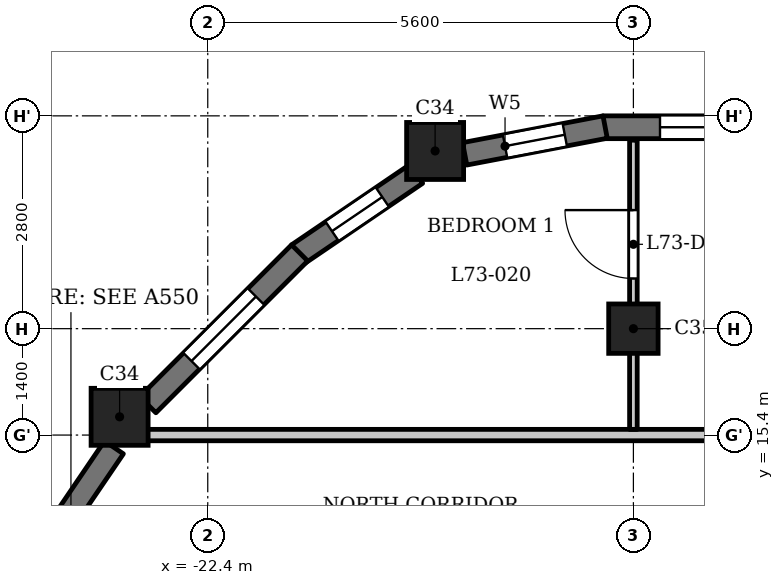
"""IFC4 building model, lengths in metres.
Left out: names, types, materials, properties, quantities, classifications, styles, units other than length and angle.
Written with IfcOpenShell. Run it as: python <this file> out.ifc"""

import sys

from ifc_helpers import new_model, si_unit, direction, frame, frame_2d, origin, origin_2d, place, context, subcontext, project, spatial, rectangle, extrude, element, fill, save


model = new_model("IFC4")
c1 = context("Model", 3, precision=1e-05, world=origin(), true_north=direction((0.0, 1.0)))
c2 = subcontext(c1, "Body", "Model", "MODEL_VIEW")
j1 = project(units=[si_unit("LENGTHUNIT", "METRE"), si_unit("PLANEANGLEUNIT", "RADIAN")], contexts=[c1])
p1 = place(None, origin())
s1 = spatial("IfcSite", under=j1, at=p1, CompositionType="ELEMENT")
p2 = place(p1, origin())
s2 = spatial("IfcBuilding", under=s1, at=p2, CompositionType="ELEMENT")
p3 = place(p2, frame((0.0, 0.0, 280.2)))
s3 = spatial("IfcBuildingStorey", under=s2, at=p3, CompositionType="ELEMENT", Elevation=280.2)
for number, where, z_axis, x_axis in (
    (1, (-19.409, 19.138, 0.0), (0.0, 0.0, 1.0), (1.0, 0.0, 0.0)),
    (2, (-23.56, 15.64, 0.0), (0.0, 0.0, 1.0), (1.0, 0.0, 0.0)),
):
    element("IfcColumn", number, at=place(p3, frame(where, z_axis=z_axis, x_axis=x_axis)), inside=s3, PredefinedType="COLUMN", context=c2, shape_type="SweptSolid", body=[
        extrude(rectangle(XDim=0.75, YDim=0.75, at=origin_2d()), origin(), (0.0, 0.0, 1.0), 3.5),
    ])
p4 = place(p3, frame((-16.8, 16.8, 0.0), z_axis=(0.0, 0.0, 1.0), x_axis=(1.0, 0.0, 0.0)))
e3 = element("IfcColumn", 3, at=p4, inside=s3, PredefinedType="COLUMN", context=c2, shape_type="SweptSolid", body=[
    extrude(rectangle(XDim=0.65, YDim=0.65, at=origin_2d()), origin(), (0.0, 0.0, 1.0), 3.5),
])
p5 = place(p3, frame((-14.375, 19.45, 0.0), z_axis=(0.0, 0.0, 1.0), x_axis=(-1.0, 0.0, 0.0)))
e4 = element("IfcWall", 4, at=p5, inside=s3, PredefinedType="SOLIDWALL", context=c2, shape_type="SweptSolid", body=[
    extrude(rectangle(XDim=2.825, YDim=0.3, at=frame_2d((1.413, 0.0))), origin(), (0.0, 0.0, 1.0), 2.5),
])
p6 = place(p5, frame((0.275, 0.0, 0.9)))
e5 = element("IfcOpeningElement", 5, at=p6, cuts=e4, PredefinedType="OPENING", context=c2, shape_type="SweptSolid", body=[
    extrude(rectangle(XDim=1.8, YDim=1.25, at=frame_2d((0.9, 0.625))), frame((0.0, 0.16, 0.0), z_axis=(0.0, -1.0, 0.0), x_axis=(1.0, 0.0, 0.0)), (0.0, 0.0, 1.0), 0.32),
])
p7 = place(p3, frame((-17.172, 19.453, 0.0), z_axis=(0.0, 0.0, 1.0), x_axis=(-0.982284001233, -0.187398348234, 0.0)))
e6 = element("IfcWall", 6, at=p7, inside=s3, PredefinedType="SOLIDWALL", context=c2, shape_type="SweptSolid", body=[
    extrude(rectangle(XDim=1.881, YDim=0.3, at=frame_2d((0.941, 0.0))), origin(), (0.0, 0.0, 1.0), 2.5),
])
p8 = place(p7, frame((0.541, 0.0, 0.6)))
e7 = element("IfcOpeningElement", 7, at=p8, cuts=e6, PredefinedType="OPENING", context=c2, shape_type="SweptSolid", body=[
    extrude(rectangle(XDim=0.8, YDim=1.55, at=frame_2d((0.4, 0.775))), frame((0.0, 0.16, 0.0), z_axis=(0.0, -1.0, 0.0), x_axis=(1.0, 0.0, 0.0)), (0.0, 0.0, 1.0), 0.32),
])
p9 = place(p3, frame((-19.657, 18.836, 0.0), z_axis=(0.0, 0.0, 1.0), x_axis=(-0.82704477487, -0.562136051469, 0.0)))
e8 = element("IfcWall", 8, at=p9, inside=s3, PredefinedType="SOLIDWALL", context=c2, shape_type="SweptSolid", body=[
    extrude(rectangle(XDim=1.881, YDim=0.3, at=frame_2d((0.94, 0.0))), origin(), (0.0, 0.0, 1.0), 2.5),
])
p10 = place(p9, frame((0.541, 0.0, 0.6)))
e9 = element("IfcOpeningElement", 9, at=p10, cuts=e8, PredefinedType="OPENING", context=c2, shape_type="SweptSolid", body=[
    extrude(rectangle(XDim=0.8, YDim=1.55, at=frame_2d((0.4, 0.775))), frame((0.0, 0.16, 0.0), z_axis=(0.0, -1.0, 0.0), x_axis=(1.0, 0.0, 0.0)), (0.0, 0.0, 1.0), 0.32),
])
p11 = place(p3, frame((-21.191, 17.797, 0.0), z_axis=(0.0, 0.0, 1.0), x_axis=(-0.707106781187, -0.707106781187, 0.0)))
e10 = element("IfcWall", 10, at=p11, inside=s3, PredefinedType="SOLIDWALL", context=c2, shape_type="SweptSolid", body=[
    extrude(rectangle(XDim=2.825, YDim=0.3, at=frame_2d((1.413, 0.0))), origin(), (0.0, 0.0, 1.0), 2.5),
])
p12 = place(p11, frame((0.812, 0.0, 0.6)))
e11 = element("IfcOpeningElement", 11, at=p12, cuts=e10, PredefinedType="OPENING", context=c2, shape_type="SweptSolid", body=[
    extrude(rectangle(XDim=1.2, YDim=1.55, at=frame_2d((0.6, 0.775))), frame((0.0, 0.16, 0.0), z_axis=(0.0, -1.0, 0.0), x_axis=(1.0, 0.0, 0.0)), (0.0, 0.0, 1.0), 0.32),
])
p13 = place(p3, frame((-23.634, 15.237, 0.0), z_axis=(0.0, 0.0, 1.0), x_axis=(-0.562099454787, -0.827069648173, 0.0)))
e12 = element("IfcWall", 12, at=p13, inside=s3, PredefinedType="SOLIDWALL", context=c2, shape_type="SweptSolid", body=[
    extrude(rectangle(XDim=1.427, YDim=0.3, at=frame_2d((0.714, 0.0))), origin(), (0.0, 0.0, 1.0), 2.5),
])
p14 = place(p3, frame((-23.55, 15.4, 0.0), z_axis=(0.0, 0.0, 1.0), x_axis=(1.0, 0.0, 0.0)))
e13 = element("IfcWall", 13, at=p14, inside=s3, PredefinedType="PARTITIONING", context=c2, shape_type="SweptSolid", body=[
    extrude(rectangle(XDim=46.872, YDim=0.15, at=frame_2d((23.436, 0.0))), origin(), (0.0, 0.0, 1.0), 3.15),
])
p15 = place(p14, frame((13.9, 0.0, 0.0)))
e14 = element("IfcOpeningElement", 14, at=p15, cuts=e13, PredefinedType="OPENING", context=c2, shape_type="SweptSolid", body=[
    extrude(rectangle(XDim=1.0, YDim=2.1, at=frame_2d((0.5, 1.05))), frame((0.0, 0.085, 0.0), z_axis=(0.0, -1.0, 0.0), x_axis=(1.0, 0.0, 0.0)), (0.0, 0.0, 1.0), 0.17),
])
p16 = place(p14, frame((21.9, 0.0, 0.0)))
e15 = element("IfcOpeningElement", 15, at=p16, cuts=e13, PredefinedType="OPENING", context=c2, shape_type="SweptSolid", body=[
    extrude(rectangle(XDim=1.0, YDim=2.1, at=frame_2d((0.5, 1.05))), frame((0.0, 0.085, 0.0), z_axis=(0.0, -1.0, 0.0), x_axis=(1.0, 0.0, 0.0)), (0.0, 0.0, 1.0), 0.17),
])
p17 = place(p14, frame((38.7, 0.0, 0.0)))
e16 = element("IfcOpeningElement", 16, at=p17, cuts=e13, PredefinedType="OPENING", context=c2, shape_type="SweptSolid", body=[
    extrude(rectangle(XDim=1.0, YDim=2.1, at=frame_2d((0.5, 1.05))), frame((0.0, 0.085, 0.0), z_axis=(0.0, -1.0, 0.0), x_axis=(1.0, 0.0, 0.0)), (0.0, 0.0, 1.0), 0.17),
])
p18 = place(p3, frame((-16.8, 15.475, 0.0), z_axis=(0.0, 0.0, 1.0), x_axis=(0.0, 1.0, 0.0)))
e17 = element("IfcWall", 17, at=p18, inside=s3, PredefinedType="PARTITIONING", context=c2, shape_type="SweptSolid", body=[
    extrude(rectangle(XDim=3.805, YDim=0.1, at=frame_2d((1.902, 0.0))), origin(), (0.0, 0.0, 1.0), 3.15),
])
p19 = place(p18, frame((1.985, 0.0, 0.0)))
e18 = element("IfcOpeningElement", 18, at=p19, cuts=e17, PredefinedType="OPENING", context=c2, shape_type="SweptSolid", body=[
    extrude(rectangle(XDim=0.9, YDim=2.1, at=frame_2d((0.45, 1.05))), frame((0.0, 0.06, 0.0), z_axis=(0.0, -1.0, 0.0), x_axis=(1.0, 0.0, 0.0)), (0.0, 0.0, 1.0), 0.12),
])
p20 = place(p19, origin())
e19 = element("IfcDoor", 19, at=p20, inside=s3, OperationType="SINGLE_SWING_LEFT", PredefinedType="DOOR", context=c2, shape_type="SweptSolid", body=[
    extrude(rectangle(XDim=0.9, YDim=2.1, at=frame_2d((0.45, 1.05))), frame((0.0, 0.025, 0.0), z_axis=(0.0, -1.0, 0.0), x_axis=(1.0, 0.0, 0.0)), (0.0, 0.0, 1.0), 0.05),
])
fill(e18, e19)
p21 = place(p6, origin())
e20 = element("IfcWindow", 20, at=p21, inside=s3, PartitioningType="SINGLE_PANEL", PredefinedType="WINDOW", context=c2, shape_type="SweptSolid", body=[
    extrude(rectangle(XDim=1.8, YDim=1.25, at=frame_2d((0.9, 0.625))), frame((0.0, 0.03, 0.0), z_axis=(0.0, -1.0, 0.0), x_axis=(1.0, 0.0, 0.0)), (0.0, 0.0, 1.0), 0.06),
])
fill(e5, e20)
p22 = place(p8, origin())
e21 = element("IfcWindow", 21, at=p22, inside=s3, PartitioningType="SINGLE_PANEL", PredefinedType="WINDOW", context=c2, shape_type="SweptSolid", body=[
    extrude(rectangle(XDim=0.8, YDim=1.55, at=frame_2d((0.4, 0.775))), frame((0.0, 0.03, 0.0), z_axis=(0.0, -1.0, 0.0), x_axis=(1.0, 0.0, 0.0)), (0.0, 0.0, 1.0), 0.06),
])
fill(e7, e21)
p23 = place(p10, origin())
e22 = element("IfcWindow", 22, at=p23, inside=s3, PartitioningType="SINGLE_PANEL", PredefinedType="WINDOW", context=c2, shape_type="SweptSolid", body=[
    extrude(rectangle(XDim=0.8, YDim=1.55, at=frame_2d((0.4, 0.775))), frame((0.0, 0.03, 0.0), z_axis=(0.0, -1.0, 0.0), x_axis=(1.0, 0.0, 0.0)), (0.0, 0.0, 1.0), 0.06),
])
fill(e9, e22)
p24 = place(p12, origin())
e23 = element("IfcWindow", 23, at=p24, inside=s3, PartitioningType="SINGLE_PANEL", PredefinedType="WINDOW", context=c2, shape_type="SweptSolid", body=[
    extrude(rectangle(XDim=1.2, YDim=1.55, at=frame_2d((0.6, 0.775))), frame((0.0, 0.03, 0.0), z_axis=(0.0, -1.0, 0.0), x_axis=(1.0, 0.0, 0.0)), (0.0, 0.0, 1.0), 0.06),
])
fill(e11, e23)
save(model, sys.argv[1])
